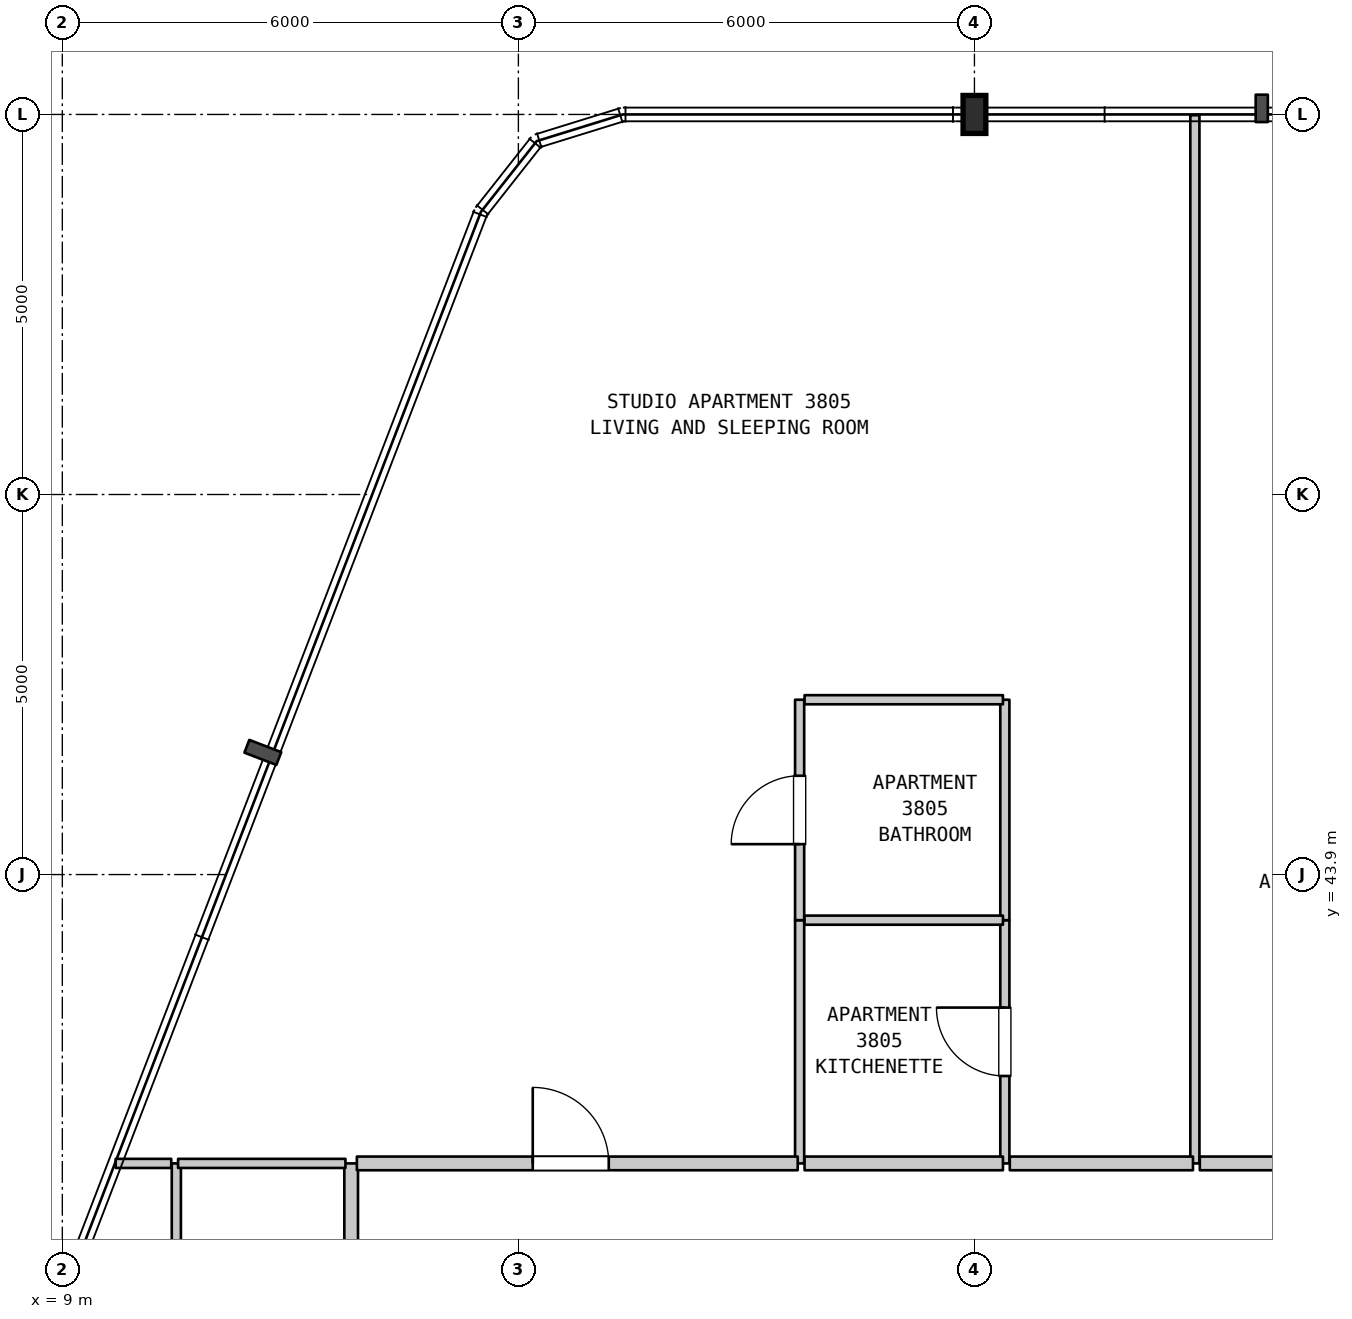
"""IFC4 building model, lengths in metres.
Left out: names, types, materials, properties, quantities, classifications, styles, units other than length and angle.
Written with IfcOpenShell. Run it as: python <this file> out.ifc"""

import sys

from ifc_helpers import new_model, si_unit, direction, frame, frame_2d, origin, origin_2d, place, context, subcontext, project, spatial, rectangle, i_section, extrude, element, fill, save


model = new_model("IFC4")
c1 = context("Model", 3, precision=1e-05, world=origin(), true_north=direction((0.0, 1.0)))
c2 = subcontext(c1, "Body", "Model", "MODEL_VIEW")
j1 = project(units=[si_unit("LENGTHUNIT", "METRE"), si_unit("PLANEANGLEUNIT", "RADIAN")], contexts=[c1])
p1 = place(None, origin())
s1 = spatial("IfcSite", under=j1, at=p1, CompositionType="ELEMENT")
p2 = place(p1, origin())
s2 = spatial("IfcBuilding", under=s1, at=p2, CompositionType="ELEMENT")
p3 = place(p2, frame((0.0, 0.0, 155.7)))
s3 = spatial("IfcBuildingStorey", under=s2, at=p3, CompositionType="ELEMENT", Elevation=155.7)
p4 = place(p3, frame((21.0, 53.9, 0.0), z_axis=(0.0, 0.0, 1.0), x_axis=(1.0, 0.0, 0.0)))
e1 = element("IfcColumn", 1, at=p4, inside=s3, PredefinedType="COLUMN", context=c2, shape_type="SweptSolid", body=[
    extrude(i_section(OverallWidth=0.3, OverallDepth=0.5, WebThickness=0.014, FlangeThickness=0.028, FilletRadius=0.027, at=origin_2d()), origin(), (0.0, 0.0, 1.0), 3.7),
])
p5 = place(p3, frame((10.5, 31.45, 0.0), z_axis=(0.0, 0.0, 1.0), x_axis=(0.0, 1.0, 0.0)))
e2 = element("IfcWall", 2, at=p5, inside=s3, PredefinedType="PARTITIONING", context=c2, shape_type="SweptSolid", body=[
    extrude(rectangle(XDim=8.65, YDim=0.12, at=frame_2d((4.325, 0.0))), origin(), (0.0, 0.0, 1.0), 3.28),
])
p6 = place(p3, frame((12.8, 31.45, 0.0), z_axis=(0.0, 0.0, 1.0), x_axis=(0.0, 1.0, 0.0)))
e3 = element("IfcWall", 3, at=p6, inside=s3, PredefinedType="STANDARD", context=c2, shape_type="SweptSolid", body=[
    extrude(rectangle(XDim=8.65, YDim=0.18, at=frame_2d((4.325, 0.0))), origin(), (0.0, 0.0, 1.0), 3.28),
])
p7 = place(p3, frame((18.7, 40.1, 0.0), z_axis=(0.0, 0.0, 1.0), x_axis=(0.0, 1.0, 0.0)))
e4 = element("IfcWall", 4, at=p7, inside=s3, PredefinedType="PARTITIONING", context=c2, shape_type="SweptSolid", body=[
    extrude(rectangle(XDim=3.2, YDim=0.12, at=frame_2d((1.6, 0.0))), origin(), (0.0, 0.0, 1.0), 3.28),
])
p8 = place(p3, frame((18.7, 43.3, 0.0), z_axis=(0.0, 0.0, 1.0), x_axis=(0.0, 1.0, 0.0)))
e5 = element("IfcWall", 5, at=p8, inside=s3, PredefinedType="PARTITIONING", context=c2, shape_type="SweptSolid", body=[
    extrude(rectangle(XDim=2.9, YDim=0.12, at=frame_2d((1.45, 0.0))), origin(), (0.0, 0.0, 1.0), 3.28),
])
p9 = place(p8, frame((1.0, 0.0, 0.0)))
e6 = element("IfcOpeningElement", 6, at=p9, cuts=e5, PredefinedType="OPENING", context=c2, shape_type="SweptSolid", body=[
    extrude(rectangle(XDim=0.9, YDim=2.1, at=frame_2d((0.45, 1.05))), frame((0.0, 0.07, 0.0), z_axis=(0.0, -1.0, 0.0), x_axis=(1.0, 0.0, 0.0)), (0.0, 0.0, 1.0), 0.14),
])
p10 = place(p3, frame((21.4, 40.1, 0.0), z_axis=(0.0, 0.0, 1.0), x_axis=(0.0, 1.0, 0.0)))
e7 = element("IfcWall", 7, at=p10, inside=s3, PredefinedType="PARTITIONING", context=c2, shape_type="SweptSolid", body=[
    extrude(rectangle(XDim=3.2, YDim=0.12, at=frame_2d((1.6, 0.0))), origin(), (0.0, 0.0, 1.0), 3.28),
])
p11 = place(p10, frame((1.15, 0.0, 0.0)))
e8 = element("IfcOpeningElement", 8, at=p11, cuts=e7, PredefinedType="OPENING", context=c2, shape_type="SweptSolid", body=[
    extrude(rectangle(XDim=0.9, YDim=2.15, at=frame_2d((0.45, 1.075))), frame((0.0, 0.07, 0.0), z_axis=(0.0, -1.0, 0.0), x_axis=(1.0, 0.0, 0.0)), (0.0, 0.0, 1.0), 0.14),
])
p12 = place(p3, frame((21.4, 43.3, 0.0), z_axis=(0.0, 0.0, 1.0), x_axis=(0.0, 1.0, 0.0)))
e9 = element("IfcWall", 9, at=p12, inside=s3, PredefinedType="PARTITIONING", context=c2, shape_type="SweptSolid", body=[
    extrude(rectangle(XDim=2.9, YDim=0.12, at=frame_2d((1.45, 0.0))), origin(), (0.0, 0.0, 1.0), 3.28),
])
p13 = place(p3, frame((23.9, 40.1, 0.0), z_axis=(0.0, 0.0, 1.0), x_axis=(0.0, 1.0, 0.0)))
e10 = element("IfcWall", 10, at=p13, inside=s3, PredefinedType="PARTITIONING", context=c2, shape_type="SweptSolid", body=[
    extrude(rectangle(XDim=13.79, YDim=0.12, at=frame_2d((6.895, 0.0))), origin(), (0.0, 0.0, 1.0), 3.28),
])
p14 = place(p3, frame((9.702, 40.1, 0.0), z_axis=(0.0, 0.0, 1.0), x_axis=(1.0, 0.0, 0.0)))
e11 = element("IfcWall", 11, at=p14, inside=s3, PredefinedType="PARTITIONING", context=c2, shape_type="SweptSolid", body=[
    extrude(rectangle(XDim=0.731, YDim=0.12, at=frame_2d((0.366, 0.0))), origin(), (0.0, 0.0, 1.0), 3.28),
])
p15 = place(p3, frame((10.523, 40.1, 0.0), z_axis=(0.0, 0.0, 1.0), x_axis=(1.0, 0.0, 0.0)))
e12 = element("IfcWall", 12, at=p15, inside=s3, PredefinedType="PARTITIONING", context=c2, shape_type="SweptSolid", body=[
    extrude(rectangle(XDim=2.202, YDim=0.12, at=frame_2d((1.101, 0.0))), origin(), (0.0, 0.0, 1.0), 3.28),
])
p16 = place(p3, frame((12.875, 40.1, 0.0), z_axis=(0.0, 0.0, 1.0), x_axis=(1.0, 0.0, 0.0)))
e13 = element("IfcWall", 13, at=p16, inside=s3, PredefinedType="STANDARD", context=c2, shape_type="SweptSolid", body=[
    extrude(rectangle(XDim=5.8, YDim=0.18, at=frame_2d((2.9, 0.0))), origin(), (0.0, 0.0, 1.0), 3.28),
])
p17 = place(p16, frame((2.314, 0.0, 0.0)))
e14 = element("IfcOpeningElement", 14, at=p17, cuts=e13, PredefinedType="OPENING", context=c2, shape_type="SweptSolid", body=[
    extrude(rectangle(XDim=1.0, YDim=2.15, at=frame_2d((0.5, 1.075))), frame((0.0, 0.1, 0.0), z_axis=(0.0, -1.0, 0.0), x_axis=(1.0, 0.0, 0.0)), (0.0, 0.0, 1.0), 0.2),
])
p18 = place(p3, frame((18.765, 40.1, 0.0), z_axis=(0.0, 0.0, 1.0), x_axis=(1.0, 0.0, 0.0)))
e15 = element("IfcWall", 15, at=p18, inside=s3, PredefinedType="STANDARD", context=c2, shape_type="SweptSolid", body=[
    extrude(rectangle(XDim=2.61, YDim=0.18, at=frame_2d((1.305, 0.0))), origin(), (0.0, 0.0, 1.0), 3.28),
])
p19 = place(p3, frame((21.465, 40.1, 0.0), z_axis=(0.0, 0.0, 1.0), x_axis=(1.0, 0.0, 0.0)))
e16 = element("IfcWall", 16, at=p19, inside=s3, PredefinedType="STANDARD", context=c2, shape_type="SweptSolid", body=[
    extrude(rectangle(XDim=2.41, YDim=0.18, at=frame_2d((1.205, 0.0))), origin(), (0.0, 0.0, 1.0), 3.28),
])
p20 = place(p3, frame((23.965, 40.1, 0.0), z_axis=(0.0, 0.0, 1.0), x_axis=(1.0, 0.0, 0.0)))
e17 = element("IfcWall", 17, at=p20, inside=s3, PredefinedType="STANDARD", context=c2, shape_type="SweptSolid", body=[
    extrude(rectangle(XDim=4.42, YDim=0.18, at=frame_2d((2.21, 0.0))), origin(), (0.0, 0.0, 1.0), 3.28),
])
p21 = place(p20, frame((1.638, 0.0, 0.0)))
e18 = element("IfcOpeningElement", 18, at=p21, cuts=e17, PredefinedType="OPENING", context=c2, shape_type="SweptSolid", body=[
    extrude(rectangle(XDim=1.0, YDim=2.15, at=frame_2d((0.5, 1.075))), frame((0.0, 0.1, 0.0), z_axis=(0.0, -1.0, 0.0), x_axis=(1.0, 0.0, 0.0)), (0.0, 0.0, 1.0), 0.2),
])
for number, where, z_axis, x_axis in (
    (19, (18.765, 43.3, 0.0), (0.0, 0.0, 1.0), (1.0, 0.0, 0.0)),
    (20, (18.765, 46.2, 0.0), (0.0, 0.0, 1.0), (1.0, 0.0, 0.0)),
):
    element("IfcWall", number, at=place(p3, frame(where, z_axis=z_axis, x_axis=x_axis)), inside=s3, PredefinedType="PARTITIONING", context=c2, shape_type="SweptSolid", body=[
        extrude(rectangle(XDim=2.61, YDim=0.12, at=frame_2d((1.305, 0.0))), origin(), (0.0, 0.0, 1.0), 3.28),
    ])
p22 = place(p9, origin())
e21 = element("IfcDoor", 21, at=p22, inside=s3, OperationType="SINGLE_SWING_LEFT", PredefinedType="DOOR", context=c2, shape_type="SweptSolid", body=[
    extrude(rectangle(XDim=0.9, YDim=2.1, at=frame_2d((0.45, 1.05))), frame((0.0, 0.025, 0.0), z_axis=(0.0, -1.0, 0.0), x_axis=(1.0, 0.0, 0.0)), (0.0, 0.0, 1.0), 0.05),
])
fill(e6, e21)
p23 = place(p11, origin())
e22 = element("IfcDoor", 22, at=p23, inside=s3, OperationType="SINGLE_SWING_RIGHT", PredefinedType="DOOR", context=c2, shape_type="SweptSolid", body=[
    extrude(rectangle(XDim=0.9, YDim=2.15, at=frame_2d((0.45, 1.075))), frame((0.0, 0.025, 0.0), z_axis=(0.0, -1.0, 0.0), x_axis=(1.0, 0.0, 0.0)), (0.0, 0.0, 1.0), 0.05),
])
fill(e8, e22)
p24 = place(p17, origin())
e23 = element("IfcDoor", 23, at=p24, inside=s3, OperationType="SINGLE_SWING_LEFT", PredefinedType="DOOR", context=c2, shape_type="SweptSolid", body=[
    extrude(rectangle(XDim=1.0, YDim=2.15, at=frame_2d((0.5, 1.075))), frame((0.0, 0.025, 0.0), z_axis=(0.0, -1.0, 0.0), x_axis=(1.0, 0.0, 0.0)), (0.0, 0.0, 1.0), 0.05),
])
fill(e14, e23)
save(model, sys.argv[1])
